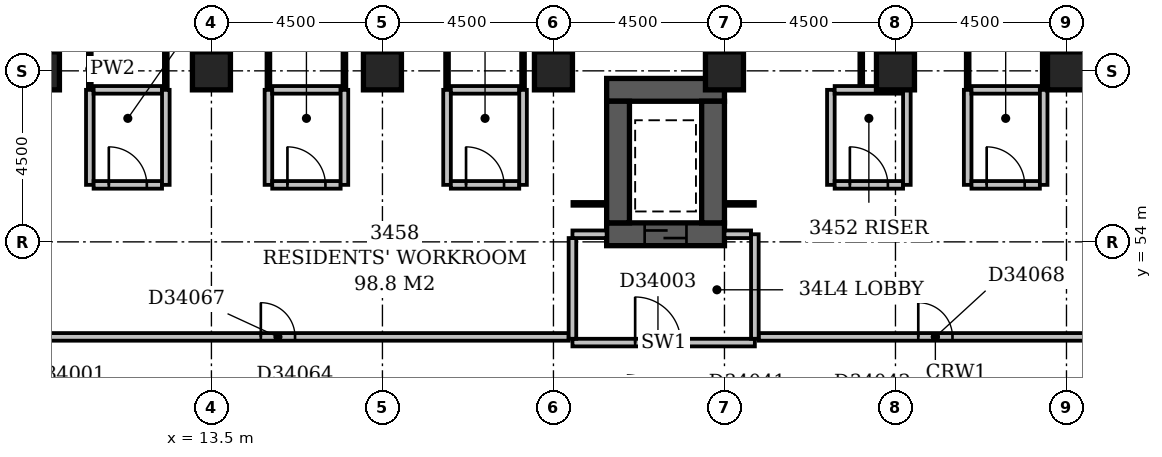
"""IFC4 building model, lengths in metres.
Left out: names, types, materials, properties, quantities, classifications, styles, units other than length and angle.
Written with IfcOpenShell. Run it as: python <this file> out.ifc"""

import sys

from ifc_helpers import new_model, si_unit, direction, frame, frame_2d, origin, origin_2d, place, context, subcontext, project, spatial, rectangle, extrude, element, fill, save


model = new_model("IFC4")
c1 = context("Model", 3, precision=1e-05, world=origin(), true_north=direction((0.0, 1.0)))
c2 = subcontext(c1, "Body", "Model", "MODEL_VIEW")
j1 = project(units=[si_unit("LENGTHUNIT", "METRE"), si_unit("PLANEANGLEUNIT", "RADIAN")], contexts=[c1])
p1 = place(None, origin())
s1 = spatial("IfcSite", under=j1, at=p1, CompositionType="ELEMENT")
p2 = place(p1, origin())
s2 = spatial("IfcBuilding", under=s1, at=p2, CompositionType="ELEMENT")
p3 = place(p2, frame((0.0, 0.0, 137.6)))
s3 = spatial("IfcBuildingStorey", under=s2, at=p3, CompositionType="ELEMENT", Elevation=137.6)
p4 = place(p3, frame((23.9, 54.2, -0.3), z_axis=(0.0, 0.0, 1.0), x_axis=(1.0, 0.0, 0.0)))
e1 = element("IfcWall", 1, at=p4, inside=s3, PredefinedType="SHEAR", context=c2, shape_type="SweptSolid", body=[
    extrude(rectangle(XDim=3.1, YDim=0.6, at=frame_2d((1.55, 0.0))), origin(), (0.0, 0.0, 1.0), 3.6),
])
p5 = place(p4, frame((1.0, 0.0, 0.3)))
e2 = element("IfcOpeningElement", 2, at=p5, cuts=e1, PredefinedType="OPENING", context=c2, shape_type="SweptSolid", body=[
    extrude(rectangle(XDim=1.1, YDim=2.1, at=frame_2d((0.55, 1.05))), frame((0.0, 0.312, 0.0), z_axis=(0.0, -1.0, 0.0), x_axis=(1.0, 0.0, 0.0)), (0.0, 0.0, 1.0), 0.624),
])
p6 = place(p3, frame((23.9, 58.0, -0.3), z_axis=(0.0, 0.0, 1.0), x_axis=(1.0, 0.0, 0.0)))
e3 = element("IfcWall", 3, at=p6, inside=s3, PredefinedType="SHEAR", context=c2, shape_type="SweptSolid", body=[
    extrude(rectangle(XDim=3.1, YDim=0.6, at=frame_2d((1.55, 0.0))), origin(), (0.0, 0.0, 1.0), 3.6),
])
for number, where, z_axis, x_axis in (
    (4, (24.2, 54.5, -0.3), (0.0, 0.0, 1.0), (0.0, 1.0, 0.0)),
    (5, (26.7, 54.5, -0.3), (0.0, 0.0, 1.0), (0.0, 1.0, 0.0)),
):
    element("IfcWall", number, at=place(p3, frame(where, z_axis=z_axis, x_axis=x_axis)), inside=s3, PredefinedType="SHEAR", context=c2, shape_type="SweptSolid", body=[
        extrude(rectangle(XDim=3.2, YDim=0.6, at=frame_2d((1.6, 0.0))), origin(), (0.0, 0.0, 1.0), 3.6),
    ])
for number, where, z_axis, x_axis in (
    (6, (9.0, 58.5, -0.3), (0.0, 0.0, 1.0), (1.0, 0.0, 0.0)),
    (7, (13.5, 58.5, -0.3), (0.0, 0.0, 1.0), (1.0, 0.0, 0.0)),
    (8, (18.0, 58.5, -0.3), (0.0, 0.0, 1.0), (1.0, 0.0, 0.0)),
    (9, (22.5, 58.5, -0.3), (0.0, 0.0, 1.0), (1.0, 0.0, 0.0)),
    (10, (27.0, 58.5, -0.3), (0.0, 0.0, 1.0), (1.0, 0.0, 0.0)),
    (11, (31.5, 58.5, -0.3), (0.0, 0.0, 1.0), (1.0, 0.0, 0.0)),
    (12, (36.0, 58.5, -0.3), (0.0, 0.0, 1.0), (1.0, 0.0, 0.0)),
):
    element("IfcColumn", number, at=place(p3, frame(where, z_axis=z_axis, x_axis=x_axis)), inside=s3, PredefinedType="COLUMN", context=c2, shape_type="SweptSolid", body=[
        extrude(rectangle(XDim=1.0, YDim=1.0, at=origin_2d()), origin(), (0.0, 0.0, 1.0), 3.6),
    ])
p7 = place(p3, frame((23.0, 51.35, 0.0), z_axis=(0.0, 0.0, 1.0), x_axis=(1.0, 0.0, 0.0)))
e13 = element("IfcWall", 13, at=p7, inside=s3, PredefinedType="PARTITIONING", context=c2, shape_type="SweptSolid", body=[
    extrude(rectangle(XDim=4.8, YDim=0.2, at=frame_2d((2.4, 0.0))), origin(), (0.0, 0.0, 1.0), 3.3),
])
p8 = place(p7, frame((1.65, 0.0, 0.0)))
e14 = element("IfcOpeningElement", 14, at=p8, cuts=e13, PredefinedType="OPENING", context=c2, shape_type="SweptSolid", body=[
    extrude(rectangle(XDim=1.2, YDim=2.1, at=frame_2d((0.6, 1.05))), frame((0.0, 0.112, 0.0), z_axis=(0.0, -1.0, 0.0), x_axis=(1.0, 0.0, 0.0)), (0.0, 0.0, 1.0), 0.224),
])
p9 = place(p3, frame((27.8, 51.45, 0.0), z_axis=(0.0, 0.0, 1.0), x_axis=(0.0, 1.0, 0.0)))
e15 = element("IfcWall", 15, at=p9, inside=s3, PredefinedType="PARTITIONING", context=c2, shape_type="SweptSolid", body=[
    extrude(rectangle(XDim=2.75, YDim=0.2, at=frame_2d((1.375, 0.0))), origin(), (0.0, 0.0, 1.0), 3.3),
])
p10 = place(p3, frame((23.0, 54.2, 0.0), z_axis=(0.0, 0.0, 1.0), x_axis=(1.0, 0.0, 0.0)))
e16 = element("IfcWall", 16, at=p10, inside=s3, PredefinedType="PARTITIONING", context=c2, shape_type="SweptSolid", body=[
    extrude(rectangle(XDim=0.9, YDim=0.2, at=frame_2d((0.45, 0.0))), origin(), (0.0, 0.0, 1.0), 3.3),
])
p11 = place(p3, frame((27.0, 54.2, 0.0), z_axis=(0.0, 0.0, 1.0), x_axis=(1.0, 0.0, 0.0)))
e17 = element("IfcWall", 17, at=p11, inside=s3, PredefinedType="PARTITIONING", context=c2, shape_type="SweptSolid", body=[
    extrude(rectangle(XDim=0.7, YDim=0.2, at=frame_2d((0.35, 0.0))), origin(), (0.0, 0.0, 1.0), 3.3),
])
p12 = place(p3, frame((23.0, 51.45, 0.0), z_axis=(0.0, 0.0, 1.0), x_axis=(0.0, 1.0, 0.0)))
e18 = element("IfcWall", 18, at=p12, inside=s3, PredefinedType="PARTITIONING", context=c2, shape_type="SweptSolid", body=[
    extrude(rectangle(XDim=2.65, YDim=0.2, at=frame_2d((1.325, 0.0))), origin(), (0.0, 0.0, 1.0), 3.3),
])
p13 = place(p3, frame((7.6, 51.5, 0.0), z_axis=(0.0, 0.0, 1.0), x_axis=(1.0, 0.0, 0.0)))
e19 = element("IfcWall", 19, at=p13, inside=s3, PredefinedType="PARTITIONING", context=c2, shape_type="SweptSolid", body=[
    extrude(rectangle(XDim=15.3, YDim=0.2, at=frame_2d((7.65, 0.0))), origin(), (0.0, 0.0, 1.0), 3.3),
])
p14 = place(p13, frame((7.2, 0.0, 0.0)))
e20 = element("IfcOpeningElement", 20, at=p14, cuts=e19, PredefinedType="OPENING", context=c2, shape_type="SweptSolid", body=[
    extrude(rectangle(XDim=0.9, YDim=2.1, at=frame_2d((0.45, 1.05))), frame((0.0, 0.112, 0.0), z_axis=(0.0, -1.0, 0.0), x_axis=(1.0, 0.0, 0.0)), (0.0, 0.0, 1.0), 0.224),
])
p15 = place(p3, frame((27.9, 51.5, 0.0), z_axis=(0.0, 0.0, 1.0), x_axis=(1.0, 0.0, 0.0)))
e21 = element("IfcWall", 21, at=p15, inside=s3, PredefinedType="PARTITIONING", context=c2, shape_type="SweptSolid", body=[
    extrude(rectangle(XDim=9.3, YDim=0.2, at=frame_2d((4.65, 0.0))), origin(), (0.0, 0.0, 1.0), 3.3),
])
p16 = place(p15, frame((4.2, 0.0, 0.0)))
e22 = element("IfcOpeningElement", 22, at=p16, cuts=e21, PredefinedType="OPENING", context=c2, shape_type="SweptSolid", body=[
    extrude(rectangle(XDim=0.9, YDim=2.1, at=frame_2d((0.45, 1.05))), frame((0.0, 0.112, 0.0), z_axis=(0.0, -1.0, 0.0), x_axis=(1.0, 0.0, 0.0)), (0.0, 0.0, 1.0), 0.224),
])
p17 = place(p3, frame((23.0, 55.0, 0.0), z_axis=(0.0, 0.0, 1.0), x_axis=(1.0, 0.0, 0.0)))
e23 = element("IfcWall", 23, at=p17, inside=s3, PredefinedType="PARTITIONING", context=c2, shape_type="SweptSolid", body=[
    extrude(rectangle(XDim=0.9, YDim=0.1, at=frame_2d((0.45, 0.0))), origin(), (0.0, 0.0, 1.0), 3.3),
])
p18 = place(p3, frame((27.0, 55.0, 0.0), z_axis=(0.0, 0.0, 1.0), x_axis=(1.0, 0.0, 0.0)))
e24 = element("IfcWall", 24, at=p18, inside=s3, PredefinedType="PARTITIONING", context=c2, shape_type="SweptSolid", body=[
    extrude(rectangle(XDim=0.8, YDim=0.1, at=frame_2d((0.4, 0.0))), origin(), (0.0, 0.0, 1.0), 3.3),
])
p19 = place(p3, frame((10.3, 55.5, 0.0), z_axis=(0.0, 0.0, 1.0), x_axis=(0.0, 1.0, 0.0)))
e25 = element("IfcWall", 25, at=p19, inside=s3, PredefinedType="PARTITIONING", context=c2, shape_type="SweptSolid", body=[
    extrude(rectangle(XDim=2.5, YDim=0.2, at=frame_2d((1.25, 0.0))), origin(), (0.0, 0.0, 1.0), 3.3),
])
p20 = place(p3, frame((10.4, 55.5, 0.0), z_axis=(0.0, 0.0, 1.0), x_axis=(1.0, 0.0, 0.0)))
e26 = element("IfcWall", 26, at=p20, inside=s3, PredefinedType="PARTITIONING", context=c2, shape_type="SweptSolid", body=[
    extrude(rectangle(XDim=1.8, YDim=0.2, at=frame_2d((0.9, 0.0))), origin(), (0.0, 0.0, 1.0), 3.3),
])
p21 = place(p20, frame((0.4, 0.0, 0.0)))
e27 = element("IfcOpeningElement", 27, at=p21, cuts=e26, PredefinedType="OPENING", context=c2, shape_type="SweptSolid", body=[
    extrude(rectangle(XDim=1.0, YDim=2.1, at=frame_2d((0.5, 1.05))), frame((0.0, 0.112, 0.0), z_axis=(0.0, -1.0, 0.0), x_axis=(1.0, 0.0, 0.0)), (0.0, 0.0, 1.0), 0.224),
])
for number, where, z_axis, x_axis in (
    (28, (12.3, 55.5, 0.0), (0.0, 0.0, 1.0), (0.0, 1.0, 0.0)),
    (29, (15.0, 55.5, 0.0), (0.0, 0.0, 1.0), (0.0, 1.0, 0.0)),
):
    element("IfcWall", number, at=place(p3, frame(where, z_axis=z_axis, x_axis=x_axis)), inside=s3, PredefinedType="PARTITIONING", context=c2, shape_type="SweptSolid", body=[
        extrude(rectangle(XDim=2.5, YDim=0.2, at=frame_2d((1.25, 0.0))), origin(), (0.0, 0.0, 1.0), 3.3),
    ])
p22 = place(p3, frame((15.1, 55.5, 0.0), z_axis=(0.0, 0.0, 1.0), x_axis=(1.0, 0.0, 0.0)))
e30 = element("IfcWall", 30, at=p22, inside=s3, PredefinedType="PARTITIONING", context=c2, shape_type="SweptSolid", body=[
    extrude(rectangle(XDim=1.8, YDim=0.2, at=frame_2d((0.9, 0.0))), origin(), (0.0, 0.0, 1.0), 3.3),
])
p23 = place(p22, frame((0.4, 0.0, 0.0)))
e31 = element("IfcOpeningElement", 31, at=p23, cuts=e30, PredefinedType="OPENING", context=c2, shape_type="SweptSolid", body=[
    extrude(rectangle(XDim=1.0, YDim=2.1, at=frame_2d((0.5, 1.05))), frame((0.0, 0.112, 0.0), z_axis=(0.0, -1.0, 0.0), x_axis=(1.0, 0.0, 0.0)), (0.0, 0.0, 1.0), 0.224),
])
for number, where, z_axis, x_axis in (
    (32, (17.0, 55.5, 0.0), (0.0, 0.0, 1.0), (0.0, 1.0, 0.0)),
    (33, (19.7, 55.5, 0.0), (0.0, 0.0, 1.0), (0.0, 1.0, 0.0)),
):
    element("IfcWall", number, at=place(p3, frame(where, z_axis=z_axis, x_axis=x_axis)), inside=s3, PredefinedType="PARTITIONING", context=c2, shape_type="SweptSolid", body=[
        extrude(rectangle(XDim=2.5, YDim=0.2, at=frame_2d((1.25, 0.0))), origin(), (0.0, 0.0, 1.0), 3.3),
    ])
p24 = place(p3, frame((19.8, 55.5, 0.0), z_axis=(0.0, 0.0, 1.0), x_axis=(1.0, 0.0, 0.0)))
e34 = element("IfcWall", 34, at=p24, inside=s3, PredefinedType="PARTITIONING", context=c2, shape_type="SweptSolid", body=[
    extrude(rectangle(XDim=1.8, YDim=0.2, at=frame_2d((0.9, 0.0))), origin(), (0.0, 0.0, 1.0), 3.3),
])
p25 = place(p24, frame((0.4, 0.0, 0.0)))
e35 = element("IfcOpeningElement", 35, at=p25, cuts=e34, PredefinedType="OPENING", context=c2, shape_type="SweptSolid", body=[
    extrude(rectangle(XDim=1.0, YDim=2.1, at=frame_2d((0.5, 1.05))), frame((0.0, 0.112, 0.0), z_axis=(0.0, -1.0, 0.0), x_axis=(1.0, 0.0, 0.0)), (0.0, 0.0, 1.0), 0.224),
])
for number, where, z_axis, x_axis in (
    (36, (21.7, 55.5, 0.0), (0.0, 0.0, 1.0), (0.0, 1.0, 0.0)),
    (37, (29.8, 55.5, 0.0), (0.0, 0.0, 1.0), (0.0, 1.0, 0.0)),
):
    element("IfcWall", number, at=place(p3, frame(where, z_axis=z_axis, x_axis=x_axis)), inside=s3, PredefinedType="PARTITIONING", context=c2, shape_type="SweptSolid", body=[
        extrude(rectangle(XDim=2.5, YDim=0.2, at=frame_2d((1.25, 0.0))), origin(), (0.0, 0.0, 1.0), 3.3),
    ])
p26 = place(p3, frame((29.9, 55.5, 0.0), z_axis=(0.0, 0.0, 1.0), x_axis=(1.0, 0.0, 0.0)))
e38 = element("IfcWall", 38, at=p26, inside=s3, PredefinedType="PARTITIONING", context=c2, shape_type="SweptSolid", body=[
    extrude(rectangle(XDim=1.8, YDim=0.2, at=frame_2d((0.9, 0.0))), origin(), (0.0, 0.0, 1.0), 3.3),
])
p27 = place(p26, frame((0.4, 0.0, 0.0)))
e39 = element("IfcOpeningElement", 39, at=p27, cuts=e38, PredefinedType="OPENING", context=c2, shape_type="SweptSolid", body=[
    extrude(rectangle(XDim=1.0, YDim=2.1, at=frame_2d((0.5, 1.05))), frame((0.0, 0.112, 0.0), z_axis=(0.0, -1.0, 0.0), x_axis=(1.0, 0.0, 0.0)), (0.0, 0.0, 1.0), 0.224),
])
for number, where, z_axis, x_axis in (
    (40, (31.8, 55.5, 0.0), (0.0, 0.0, 1.0), (0.0, 1.0, 0.0)),
    (41, (33.4, 55.5, 0.0), (0.0, 0.0, 1.0), (0.0, 1.0, 0.0)),
):
    element("IfcWall", number, at=place(p3, frame(where, z_axis=z_axis, x_axis=x_axis)), inside=s3, PredefinedType="PARTITIONING", context=c2, shape_type="SweptSolid", body=[
        extrude(rectangle(XDim=2.5, YDim=0.2, at=frame_2d((1.25, 0.0))), origin(), (0.0, 0.0, 1.0), 3.3),
    ])
p28 = place(p3, frame((33.5, 55.5, 0.0), z_axis=(0.0, 0.0, 1.0), x_axis=(1.0, 0.0, 0.0)))
e42 = element("IfcWall", 42, at=p28, inside=s3, PredefinedType="PARTITIONING", context=c2, shape_type="SweptSolid", body=[
    extrude(rectangle(XDim=1.8, YDim=0.2, at=frame_2d((0.9, 0.0))), origin(), (0.0, 0.0, 1.0), 3.3),
])
p29 = place(p28, frame((0.4, 0.0, 0.0)))
e43 = element("IfcOpeningElement", 43, at=p29, cuts=e42, PredefinedType="OPENING", context=c2, shape_type="SweptSolid", body=[
    extrude(rectangle(XDim=1.0, YDim=2.1, at=frame_2d((0.5, 1.05))), frame((0.0, 0.112, 0.0), z_axis=(0.0, -1.0, 0.0), x_axis=(1.0, 0.0, 0.0)), (0.0, 0.0, 1.0), 0.224),
])
p30 = place(p3, frame((35.4, 55.5, 0.0), z_axis=(0.0, 0.0, 1.0), x_axis=(0.0, 1.0, 0.0)))
e44 = element("IfcWall", 44, at=p30, inside=s3, PredefinedType="PARTITIONING", context=c2, shape_type="SweptSolid", body=[
    extrude(rectangle(XDim=2.5, YDim=0.2, at=frame_2d((1.25, 0.0))), origin(), (0.0, 0.0, 1.0), 2.4),
])
p31 = place(p3, frame((10.3, 58.0, 0.0), z_axis=(0.0, 0.0, 1.0), x_axis=(0.0, 1.0, 0.0)))
e45 = element("IfcWall", 45, at=p31, inside=s3, PredefinedType="PARTITIONING", context=c2, shape_type="SweptSolid", body=[
    extrude(rectangle(XDim=1.1, YDim=0.1, at=frame_2d((0.55, 0.0))), origin(), (0.0, 0.0, 1.0), 3.3),
])
p32 = place(p3, frame((10.4, 58.0, 0.0), z_axis=(0.0, 0.0, 1.0), x_axis=(1.0, 0.0, 0.0)))
e46 = element("IfcWall", 46, at=p32, inside=s3, PredefinedType="PARTITIONING", context=c2, shape_type="SweptSolid", body=[
    extrude(rectangle(XDim=1.8, YDim=0.2, at=frame_2d((0.9, 0.0))), origin(), (0.0, 0.0, 1.0), 3.3),
])
for number, where, z_axis, x_axis in (
    (47, (12.3, 58.0, 0.0), (0.0, 0.0, 1.0), (0.0, 1.0, 0.0)),
    (48, (15.0, 58.0, 0.0), (0.0, 0.0, 1.0), (0.0, 1.0, 0.0)),
):
    element("IfcWall", number, at=place(p3, frame(where, z_axis=z_axis, x_axis=x_axis)), inside=s3, PredefinedType="PARTITIONING", context=c2, shape_type="SweptSolid", body=[
        extrude(rectangle(XDim=1.1, YDim=0.1, at=frame_2d((0.55, 0.0))), origin(), (0.0, 0.0, 1.0), 3.3),
    ])
p33 = place(p3, frame((15.1, 58.0, 0.0), z_axis=(0.0, 0.0, 1.0), x_axis=(1.0, 0.0, 0.0)))
e49 = element("IfcWall", 49, at=p33, inside=s3, PredefinedType="PARTITIONING", context=c2, shape_type="SweptSolid", body=[
    extrude(rectangle(XDim=1.8, YDim=0.2, at=frame_2d((0.9, 0.0))), origin(), (0.0, 0.0, 1.0), 3.3),
])
for number, where, z_axis, x_axis in (
    (50, (17.0, 58.0, 0.0), (0.0, 0.0, 1.0), (0.0, 1.0, 0.0)),
    (51, (19.7, 58.0, 0.0), (0.0, 0.0, 1.0), (0.0, 1.0, 0.0)),
):
    element("IfcWall", number, at=place(p3, frame(where, z_axis=z_axis, x_axis=x_axis)), inside=s3, PredefinedType="PARTITIONING", context=c2, shape_type="SweptSolid", body=[
        extrude(rectangle(XDim=1.1, YDim=0.1, at=frame_2d((0.55, 0.0))), origin(), (0.0, 0.0, 1.0), 3.3),
    ])
p34 = place(p3, frame((19.8, 58.0, 0.0), z_axis=(0.0, 0.0, 1.0), x_axis=(1.0, 0.0, 0.0)))
e52 = element("IfcWall", 52, at=p34, inside=s3, PredefinedType="PARTITIONING", context=c2, shape_type="SweptSolid", body=[
    extrude(rectangle(XDim=1.8, YDim=0.2, at=frame_2d((0.9, 0.0))), origin(), (0.0, 0.0, 1.0), 3.3),
])
p35 = place(p3, frame((21.7, 58.0, 0.0), z_axis=(0.0, 0.0, 1.0), x_axis=(0.0, 1.0, 0.0)))
e53 = element("IfcWall", 53, at=p35, inside=s3, PredefinedType="PARTITIONING", context=c2, shape_type="SweptSolid", body=[
    extrude(rectangle(XDim=1.1, YDim=0.1, at=frame_2d((0.55, 0.0))), origin(), (0.0, 0.0, 1.0), 3.3),
])
p36 = place(p3, frame((29.9, 58.0, 0.0), z_axis=(0.0, 0.0, 1.0), x_axis=(1.0, 0.0, 0.0)))
e54 = element("IfcWall", 54, at=p36, inside=s3, PredefinedType="PARTITIONING", context=c2, shape_type="SweptSolid", body=[
    extrude(rectangle(XDim=1.8, YDim=0.2, at=frame_2d((0.9, 0.0))), origin(), (0.0, 0.0, 1.0), 3.3),
])
p37 = place(p3, frame((33.4, 58.0, 0.0), z_axis=(0.0, 0.0, 1.0), x_axis=(0.0, 1.0, 0.0)))
e55 = element("IfcWall", 55, at=p37, inside=s3, PredefinedType="PARTITIONING", context=c2, shape_type="SweptSolid", body=[
    extrude(rectangle(XDim=1.1, YDim=0.1, at=frame_2d((0.55, 0.0))), origin(), (0.0, 0.0, 1.0), 3.3),
])
p38 = place(p3, frame((33.5, 58.0, 0.0), z_axis=(0.0, 0.0, 1.0), x_axis=(1.0, 0.0, 0.0)))
e56 = element("IfcWall", 56, at=p38, inside=s3, PredefinedType="PARTITIONING", context=c2, shape_type="SweptSolid", body=[
    extrude(rectangle(XDim=1.8, YDim=0.2, at=frame_2d((0.9, 0.0))), origin(), (0.0, 0.0, 1.0), 3.3),
])
p39 = place(p3, frame((35.4, 58.0, 0.0), z_axis=(0.0, 0.0, 1.0), x_axis=(0.0, 1.0, 0.0)))
e57 = element("IfcWall", 57, at=p39, inside=s3, PredefinedType="PARTITIONING", context=c2, shape_type="SweptSolid", body=[
    extrude(rectangle(XDim=1.1, YDim=0.1, at=frame_2d((0.55, 0.0))), origin(), (0.0, 0.0, 1.0), 2.4),
])
p40 = place(p3, frame((30.6, 58.1, 0.0), z_axis=(0.0, 0.0, 1.0), x_axis=(0.0, 1.0, 0.0)))
e58 = element("IfcWall", 58, at=p40, inside=s3, PredefinedType="PARTITIONING", context=c2, shape_type="SweptSolid", body=[
    extrude(rectangle(XDim=1.0, YDim=0.1, at=frame_2d((0.5, 0.0))), origin(), (0.0, 0.0, 1.0), 3.3),
])
p41 = place(p8, origin())
e59 = element("IfcDoor", 59, at=p41, inside=s3, OperationType="SINGLE_SWING_LEFT", PredefinedType="DOOR", context=c2, shape_type="SweptSolid", body=[
    extrude(rectangle(XDim=1.2, YDim=2.1, at=frame_2d((0.6, 1.05))), frame((0.0, 0.025, 0.0), z_axis=(0.0, -1.0, 0.0), x_axis=(1.0, 0.0, 0.0)), (0.0, 0.0, 1.0), 0.05),
])
fill(e14, e59)
p42 = place(p5, origin())
e60 = element("IfcDoor", 60, at=p42, inside=s3, OperationType="SLIDING_TO_LEFT", PredefinedType="DOOR", context=c2, shape_type="SweptSolid", body=[
    extrude(rectangle(XDim=1.1, YDim=2.1, at=frame_2d((0.55, 1.05))), frame((0.0, 0.025, 0.0), z_axis=(0.0, -1.0, 0.0), x_axis=(1.0, 0.0, 0.0)), (0.0, 0.0, 1.0), 0.05),
])
fill(e2, e60)
p43 = place(p14, origin())
e61 = element("IfcDoor", 61, at=p43, inside=s3, OperationType="SINGLE_SWING_LEFT", PredefinedType="DOOR", context=c2, shape_type="SweptSolid", body=[
    extrude(rectangle(XDim=0.9, YDim=2.1, at=frame_2d((0.45, 1.05))), frame((0.0, 0.025, 0.0), z_axis=(0.0, -1.0, 0.0), x_axis=(1.0, 0.0, 0.0)), (0.0, 0.0, 1.0), 0.05),
])
fill(e20, e61)
p44 = place(p16, origin())
e62 = element("IfcDoor", 62, at=p44, inside=s3, OperationType="SINGLE_SWING_LEFT", PredefinedType="DOOR", context=c2, shape_type="SweptSolid", body=[
    extrude(rectangle(XDim=0.9, YDim=2.1, at=frame_2d((0.45, 1.05))), frame((0.0, 0.025, 0.0), z_axis=(0.0, -1.0, 0.0), x_axis=(1.0, 0.0, 0.0)), (0.0, 0.0, 1.0), 0.05),
])
fill(e22, e62)
p45 = place(p21, origin())
e63 = element("IfcDoor", 63, at=p45, inside=s3, OperationType="SINGLE_SWING_LEFT", PredefinedType="DOOR", context=c2, shape_type="SweptSolid", body=[
    extrude(rectangle(XDim=1.0, YDim=2.1, at=frame_2d((0.5, 1.05))), frame((0.0, 0.025, 0.0), z_axis=(0.0, -1.0, 0.0), x_axis=(1.0, 0.0, 0.0)), (0.0, 0.0, 1.0), 0.05),
])
fill(e27, e63)
p46 = place(p23, origin())
e64 = element("IfcDoor", 64, at=p46, inside=s3, OperationType="SINGLE_SWING_LEFT", PredefinedType="DOOR", context=c2, shape_type="SweptSolid", body=[
    extrude(rectangle(XDim=1.0, YDim=2.1, at=frame_2d((0.5, 1.05))), frame((0.0, 0.025, 0.0), z_axis=(0.0, -1.0, 0.0), x_axis=(1.0, 0.0, 0.0)), (0.0, 0.0, 1.0), 0.05),
])
fill(e31, e64)
p47 = place(p25, origin())
e65 = element("IfcDoor", 65, at=p47, inside=s3, OperationType="SINGLE_SWING_LEFT", PredefinedType="DOOR", context=c2, shape_type="SweptSolid", body=[
    extrude(rectangle(XDim=1.0, YDim=2.1, at=frame_2d((0.5, 1.05))), frame((0.0, 0.025, 0.0), z_axis=(0.0, -1.0, 0.0), x_axis=(1.0, 0.0, 0.0)), (0.0, 0.0, 1.0), 0.05),
])
fill(e35, e65)
p48 = place(p27, origin())
e66 = element("IfcDoor", 66, at=p48, inside=s3, OperationType="SINGLE_SWING_LEFT", PredefinedType="DOOR", context=c2, shape_type="SweptSolid", body=[
    extrude(rectangle(XDim=1.0, YDim=2.1, at=frame_2d((0.5, 1.05))), frame((0.0, 0.025, 0.0), z_axis=(0.0, -1.0, 0.0), x_axis=(1.0, 0.0, 0.0)), (0.0, 0.0, 1.0), 0.05),
])
fill(e39, e66)
p49 = place(p29, origin())
e67 = element("IfcDoor", 67, at=p49, inside=s3, OperationType="SINGLE_SWING_LEFT", PredefinedType="DOOR", context=c2, shape_type="SweptSolid", body=[
    extrude(rectangle(XDim=1.0, YDim=2.1, at=frame_2d((0.5, 1.05))), frame((0.0, 0.025, 0.0), z_axis=(0.0, -1.0, 0.0), x_axis=(1.0, 0.0, 0.0)), (0.0, 0.0, 1.0), 0.05),
])
fill(e43, e67)
save(model, sys.argv[1])
